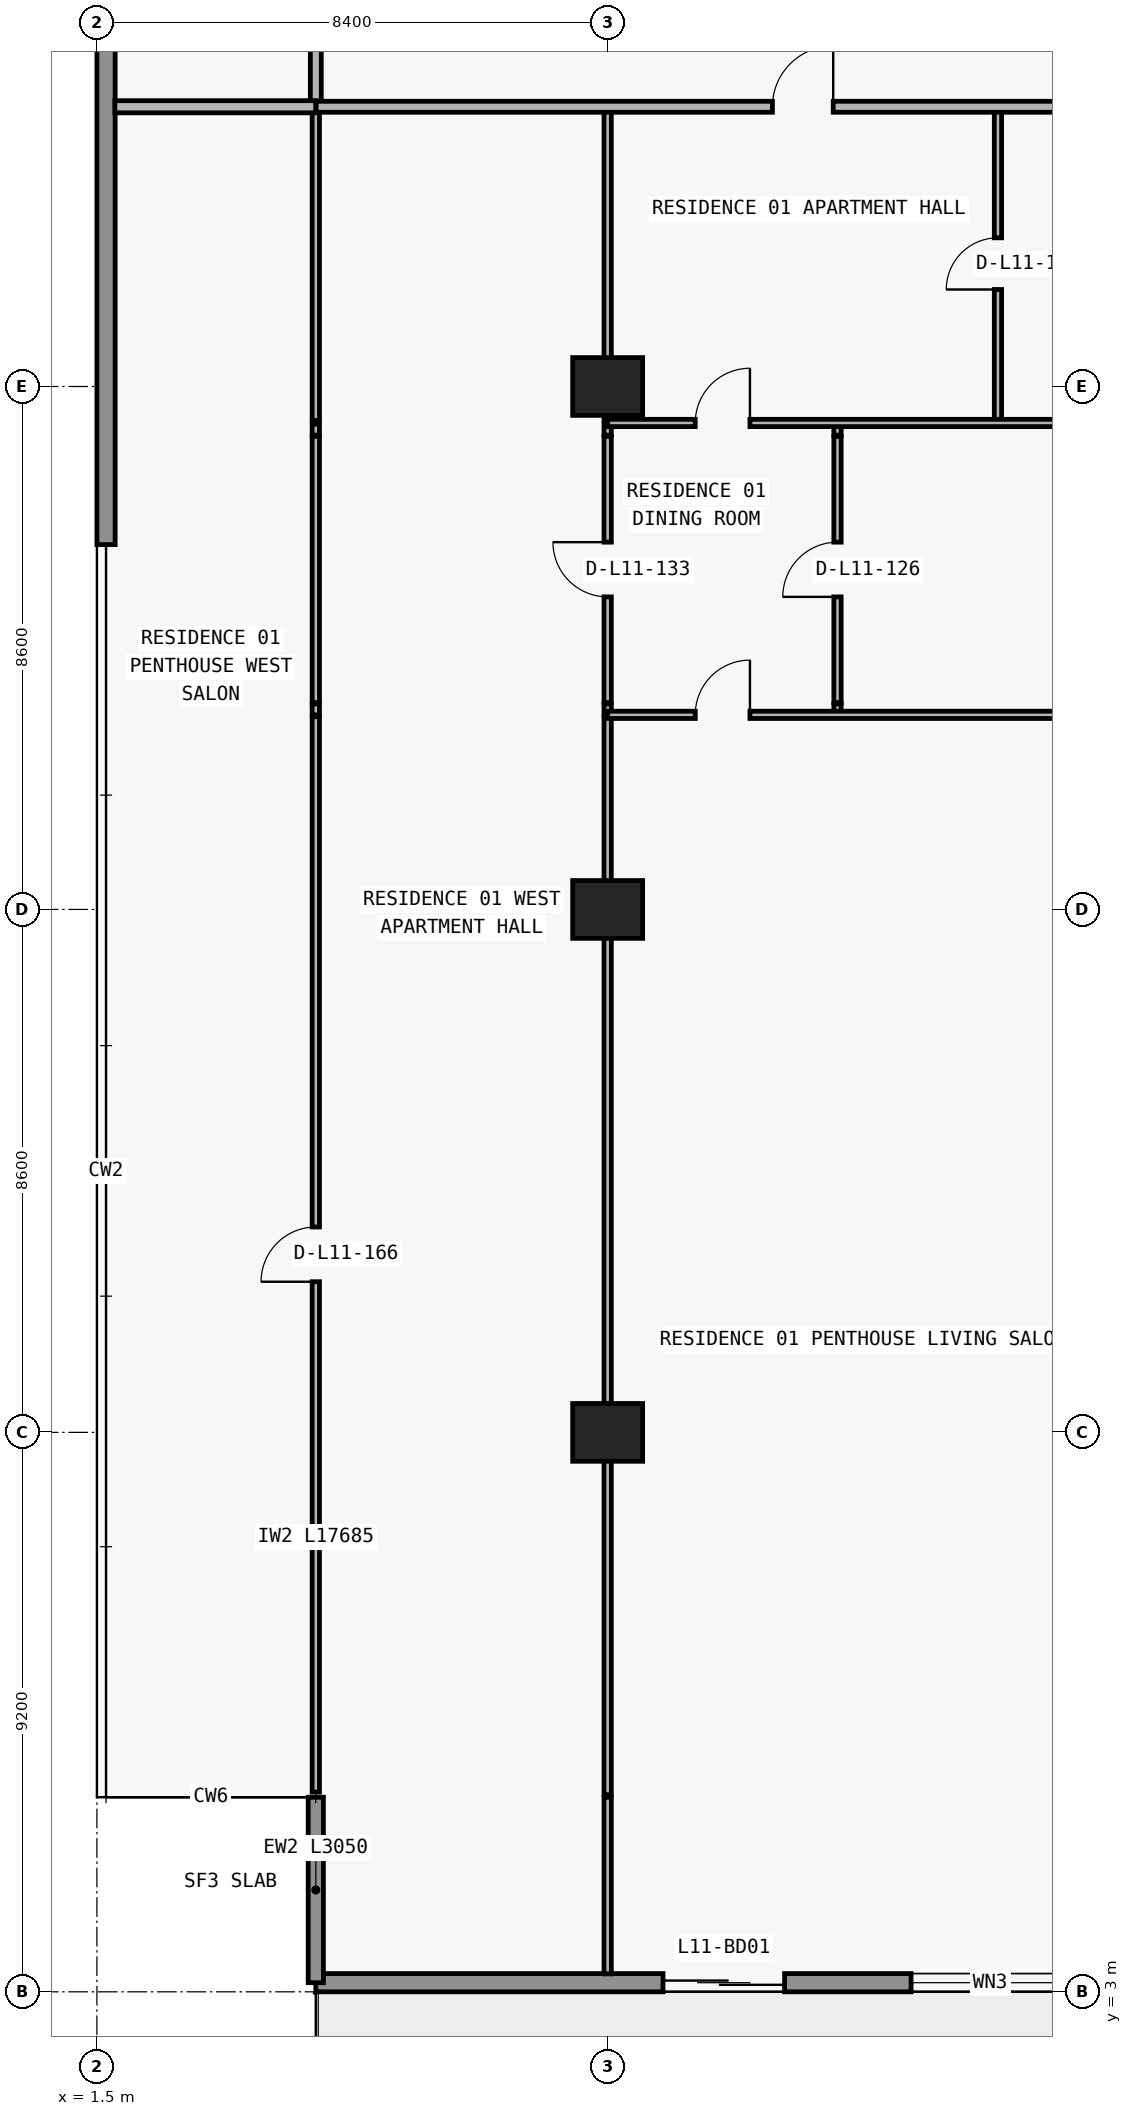
"""IFC4 building model, lengths in metres.
Left out: names, types, materials, properties, quantities, classifications, styles, units other than length and angle.
Written with IfcOpenShell. Run it as: python <this file> out.ifc"""

import sys

from ifc_helpers import new_model, si_unit, direction, frame, frame_2d, origin, origin_2d, place, context, subcontext, project, spatial, rectangle, extrude, element, fill, save


model = new_model("IFC4")
c1 = context("Model", 3, precision=1e-05, world=origin(), true_north=direction((0.0, 1.0)))
c2 = subcontext(c1, "Body", "Model", "MODEL_VIEW")
j1 = project(units=[si_unit("LENGTHUNIT", "METRE"), si_unit("PLANEANGLEUNIT", "RADIAN")], contexts=[c1])
p1 = place(None, origin())
s1 = spatial("IfcSite", under=j1, at=p1, CompositionType="ELEMENT")
p2 = place(p1, origin())
s2 = spatial("IfcBuilding", under=s1, at=p2, CompositionType="ELEMENT")
p3 = place(p2, frame((0.0, 0.0, 46.5)))
s3 = spatial("IfcBuildingStorey", under=s2, at=p3, CompositionType="ELEMENT", Elevation=46.5)
for number, where, z_axis, x_axis in (
    (1, (9.9, 12.2, 0.0), (0.0, 0.0, 1.0), (1.0, 0.0, 0.0)),
    (2, (9.9, 20.8, 0.0), (0.0, 0.0, 1.0), (1.0, 0.0, 0.0)),
    (3, (9.9, 29.4, 0.0), (0.0, 0.0, 1.0), (1.0, 0.0, 0.0)),
):
    element("IfcColumn", number, at=place(p3, frame(where, z_axis=z_axis, x_axis=x_axis)), inside=s3, PredefinedType="COLUMN", context=c2, shape_type="SweptSolid", body=[
        extrude(rectangle(XDim=1.15, YDim=0.95, at=origin_2d()), origin(), (0.0, 0.0, 1.0), 3.05),
    ])
p4 = place(p3, frame((72.7, 3.15, 0.0), z_axis=(0.0, 0.0, 1.0), x_axis=(-1.0, 0.0, 0.0)))
e4 = element("IfcWall", 4, at=p4, inside=s3, PredefinedType="STANDARD", context=c2, shape_type="SweptSolid", body=[
    extrude(rectangle(XDim=67.6, YDim=0.3, at=frame_2d((33.8, 0.0))), origin(), (0.0, 0.0, 1.0), 3.05),
])
p5 = place(p4, frame((59.89, 0.0, 0.0)))
e5 = element("IfcOpeningElement", 5, at=p5, cuts=e4, PredefinedType="OPENING", context=c2, shape_type="SweptSolid", body=[
    extrude(rectangle(XDim=2.0, YDim=2.3, at=frame_2d((1.0, 1.15))), frame((0.0, 0.16, 0.0), z_axis=(0.0, -1.0, 0.0), x_axis=(1.0, 0.0, 0.0)), (0.0, 0.0, 1.0), 0.32),
])
p6 = place(p4, frame((55.21, 0.0, 0.65)))
e6 = element("IfcOpeningElement", 6, at=p6, cuts=e4, PredefinedType="OPENING", context=c2, shape_type="SweptSolid", body=[
    extrude(rectangle(XDim=2.6, YDim=1.85, at=frame_2d((1.3, 0.925))), frame((0.0, 0.16, 0.0), z_axis=(0.0, -1.0, 0.0), x_axis=(1.0, 0.0, 0.0)), (0.0, 0.0, 1.0), 0.32),
])
p7 = place(p4, frame((49.1, 0.0, 0.85)))
e7 = element("IfcOpeningElement", 7, at=p7, cuts=e4, PredefinedType="OPENING", context=c2, shape_type="SweptSolid", body=[
    extrude(rectangle(XDim=2.2, YDim=1.55, at=frame_2d((1.1, 0.775))), frame((0.0, 0.16, 0.0), z_axis=(0.0, -1.0, 0.0), x_axis=(1.0, 0.0, 0.0)), (0.0, 0.0, 1.0), 0.32),
])
p8 = place(p4, frame((42.69, 0.0, 0.0)))
e8 = element("IfcOpeningElement", 8, at=p8, cuts=e4, PredefinedType="OPENING", context=c2, shape_type="SweptSolid", body=[
    extrude(rectangle(XDim=2.0, YDim=2.3, at=frame_2d((1.0, 1.15))), frame((0.0, 0.16, 0.0), z_axis=(0.0, -1.0, 0.0), x_axis=(1.0, 0.0, 0.0)), (0.0, 0.0, 1.0), 0.32),
])
p9 = place(p4, frame((38.59, 0.0, 0.85)))
e9 = element("IfcOpeningElement", 9, at=p9, cuts=e4, PredefinedType="OPENING", context=c2, shape_type="SweptSolid", body=[
    extrude(rectangle(XDim=1.8, YDim=1.55, at=frame_2d((0.9, 0.775))), frame((0.0, 0.16, 0.0), z_axis=(0.0, -1.0, 0.0), x_axis=(1.0, 0.0, 0.0)), (0.0, 0.0, 1.0), 0.32),
])
p10 = place(p4, frame((30.914, 0.0, 0.85)))
e10 = element("IfcOpeningElement", 10, at=p10, cuts=e4, PredefinedType="OPENING", context=c2, shape_type="SweptSolid", body=[
    extrude(rectangle(XDim=2.2, YDim=1.55, at=frame_2d((1.1, 0.775))), frame((0.0, 0.16, 0.0), z_axis=(0.0, -1.0, 0.0), x_axis=(1.0, 0.0, 0.0)), (0.0, 0.0, 1.0), 0.32),
])
p11 = place(p4, frame((26.69, 0.0, 0.0)))
e11 = element("IfcOpeningElement", 11, at=p11, cuts=e4, PredefinedType="OPENING", context=c2, shape_type="SweptSolid", body=[
    extrude(rectangle(XDim=2.0, YDim=2.3, at=frame_2d((1.0, 1.15))), frame((0.0, 0.16, 0.0), z_axis=(0.0, -1.0, 0.0), x_axis=(1.0, 0.0, 0.0)), (0.0, 0.0, 1.0), 0.32),
])
p12 = place(p4, frame((22.59, 0.0, 0.85)))
e12 = element("IfcOpeningElement", 12, at=p12, cuts=e4, PredefinedType="OPENING", context=c2, shape_type="SweptSolid", body=[
    extrude(rectangle(XDim=1.8, YDim=1.55, at=frame_2d((0.9, 0.775))), frame((0.0, 0.16, 0.0), z_axis=(0.0, -1.0, 0.0), x_axis=(1.0, 0.0, 0.0)), (0.0, 0.0, 1.0), 0.32),
])
p13 = place(p4, frame((18.69, 0.0, 0.0)))
e13 = element("IfcOpeningElement", 13, at=p13, cuts=e4, PredefinedType="OPENING", context=c2, shape_type="SweptSolid", body=[
    extrude(rectangle(XDim=2.0, YDim=2.3, at=frame_2d((1.0, 1.15))), frame((0.0, 0.16, 0.0), z_axis=(0.0, -1.0, 0.0), x_axis=(1.0, 0.0, 0.0)), (0.0, 0.0, 1.0), 0.32),
])
p14 = place(p4, frame((14.01, 0.0, 0.65)))
e14 = element("IfcOpeningElement", 14, at=p14, cuts=e4, PredefinedType="OPENING", context=c2, shape_type="SweptSolid", body=[
    extrude(rectangle(XDim=2.6, YDim=1.85, at=frame_2d((1.3, 0.925))), frame((0.0, 0.16, 0.0), z_axis=(0.0, -1.0, 0.0), x_axis=(1.0, 0.0, 0.0)), (0.0, 0.0, 1.0), 0.32),
])
p15 = place(p4, frame((7.9, 0.0, 0.85)))
e15 = element("IfcOpeningElement", 15, at=p15, cuts=e4, PredefinedType="OPENING", context=c2, shape_type="SweptSolid", body=[
    extrude(rectangle(XDim=2.2, YDim=1.55, at=frame_2d((1.1, 0.775))), frame((0.0, 0.16, 0.0), z_axis=(0.0, -1.0, 0.0), x_axis=(1.0, 0.0, 0.0)), (0.0, 0.0, 1.0), 0.32),
])
p16 = place(p3, frame((5.1, 6.2, 0.0), z_axis=(0.0, 0.0, 1.0), x_axis=(0.0, -1.0, 0.0)))
e16 = element("IfcWall", 16, at=p16, inside=s3, PredefinedType="ELEMENTEDWALL", context=c2, shape_type="SweptSolid", body=[
    extrude(rectangle(XDim=3.05, YDim=0.25, at=frame_2d((1.525, 0.0))), origin(), (0.0, 0.0, 1.0), 3.05),
])
p17 = place(p3, frame((1.65, 26.8, 0.0), z_axis=(0.0, 0.0, 1.0), x_axis=(0.0, 1.0, 0.0)))
e17 = element("IfcWall", 17, at=p17, inside=s3, PredefinedType="STANDARD", context=c2, shape_type="SweptSolid", body=[
    extrude(rectangle(XDim=20.6, YDim=0.3, at=frame_2d((10.3, 0.0))), origin(), (0.0, 0.0, 1.0), 3.05),
])
p18 = place(p3, frame((5.1, 6.285, 0.0), z_axis=(0.0, 0.0, 1.0), x_axis=(0.0, 1.0, 0.0)))
e18 = element("IfcWall", 18, at=p18, inside=s3, PredefinedType="PARTITIONING", context=c2, shape_type="SweptSolid", body=[
    extrude(rectangle(XDim=17.685, YDim=0.12, at=frame_2d((8.843, 0.0))), origin(), (0.0, 0.0, 1.0), 3.05),
])
p19 = place(p18, frame((8.393, 0.0, 0.0)))
e19 = element("IfcOpeningElement", 19, at=p19, cuts=e18, PredefinedType="OPENING", context=c2, shape_type="SweptSolid", body=[
    extrude(rectangle(XDim=0.9, YDim=2.15, at=frame_2d((0.45, 1.075))), frame((0.0, 0.07, 0.0), z_axis=(0.0, -1.0, 0.0), x_axis=(1.0, 0.0, 0.0)), (0.0, 0.0, 1.0), 0.14),
])
p20 = place(p3, frame((5.1, 24.0, 0.0), z_axis=(0.0, 0.0, 1.0), x_axis=(0.0, 1.0, 0.0)))
e20 = element("IfcWall", 20, at=p20, inside=s3, PredefinedType="PARTITIONING", context=c2, shape_type="SweptSolid", body=[
    extrude(rectangle(XDim=0.18, YDim=0.12, at=frame_2d((0.09, 0.0))), origin(), (0.0, 0.0, 1.0), 3.05),
])
p21 = place(p3, frame((5.1, 24.2, 0.0), z_axis=(0.0, 0.0, 1.0), x_axis=(0.0, 1.0, 0.0)))
e21 = element("IfcWall", 21, at=p21, inside=s3, PredefinedType="PARTITIONING", context=c2, shape_type="SweptSolid", body=[
    extrude(rectangle(XDim=4.38, YDim=0.12, at=frame_2d((2.19, 0.0))), origin(), (0.0, 0.0, 1.0), 3.05),
])
p22 = place(p3, frame((5.1, 28.6, 0.0), z_axis=(0.0, 0.0, 1.0), x_axis=(0.0, 1.0, 0.0)))
e22 = element("IfcWall", 22, at=p22, inside=s3, PredefinedType="PARTITIONING", context=c2, shape_type="SweptSolid", body=[
    extrude(rectangle(XDim=0.18, YDim=0.12, at=frame_2d((0.09, 0.0))), origin(), (0.0, 0.0, 1.0), 3.05),
])
p23 = place(p3, frame((5.1, 28.84, 0.0), z_axis=(0.0, 0.0, 1.0), x_axis=(0.0, 1.0, 0.0)))
e23 = element("IfcWall", 23, at=p23, inside=s3, PredefinedType="PARTITIONING", context=c2, shape_type="SweptSolid", body=[
    extrude(rectangle(XDim=5.16, YDim=0.12, at=frame_2d((2.58, 0.0))), origin(), (0.0, 0.0, 1.0), 3.05),
])
p24 = place(p3, frame((5.1, 34.005, 0.0), z_axis=(0.0, 0.0, 1.0), x_axis=(0.0, 1.0, 0.0)))
e24 = element("IfcWall", 24, at=p24, inside=s3, PredefinedType="PARTITIONING", context=c2, shape_type="SweptSolid", body=[
    extrude(rectangle(XDim=2.895, YDim=0.18, at=frame_2d((1.448, 0.0))), origin(), (0.0, 0.0, 1.0), 3.05),
])
p25 = place(p3, frame((9.9, 3.295, 0.0), z_axis=(0.0, 0.0, 1.0), x_axis=(0.0, 1.0, 0.0)))
e25 = element("IfcWall", 25, at=p25, inside=s3, PredefinedType="PARTITIONING", context=c2, shape_type="SweptSolid", body=[
    extrude(rectangle(XDim=2.905, YDim=0.12, at=frame_2d((1.453, 0.0))), origin(), (0.0, 0.0, 1.0), 3.05),
])
p26 = place(p3, frame((9.9, 6.24, 0.0), z_axis=(0.0, 0.0, 1.0), x_axis=(0.0, 1.0, 0.0)))
e26 = element("IfcWall", 26, at=p26, inside=s3, PredefinedType="PARTITIONING", context=c2, shape_type="SweptSolid", body=[
    extrude(rectangle(XDim=17.73, YDim=0.12, at=frame_2d((8.865, 0.0))), origin(), (0.0, 0.0, 1.0), 2.11),
])
p27 = place(p3, frame((9.9, 24.0, 0.0), z_axis=(0.0, 0.0, 1.0), x_axis=(0.0, 1.0, 0.0)))
e27 = element("IfcWall", 27, at=p27, inside=s3, PredefinedType="PARTITIONING", context=c2, shape_type="SweptSolid", body=[
    extrude(rectangle(XDim=0.18, YDim=0.12, at=frame_2d((0.09, 0.0))), origin(), (0.0, 0.0, 1.0), 2.11),
])
p28 = place(p3, frame((9.9, 24.2, 0.0), z_axis=(0.0, 0.0, 1.0), x_axis=(0.0, 1.0, 0.0)))
e28 = element("IfcWall", 28, at=p28, inside=s3, PredefinedType="PARTITIONING", context=c2, shape_type="SweptSolid", body=[
    extrude(rectangle(XDim=4.38, YDim=0.12, at=frame_2d((2.19, 0.0))), origin(), (0.0, 0.0, 1.0), 2.11),
])
p29 = place(p28, frame((1.74, 0.0, 0.0)))
e29 = element("IfcOpeningElement", 29, at=p29, cuts=e28, PredefinedType="OPENING", context=c2, shape_type="SweptSolid", body=[
    extrude(rectangle(XDim=0.9, YDim=2.06, at=frame_2d((0.45, 1.03))), frame((0.0, 0.07, 0.0), z_axis=(0.0, -1.0, 0.0), x_axis=(1.0, 0.0, 0.0)), (0.0, 0.0, 1.0), 0.14),
])
p30 = place(p3, frame((9.9, 28.6, 0.0), z_axis=(0.0, 0.0, 1.0), x_axis=(0.0, 1.0, 0.0)))
e30 = element("IfcWall", 30, at=p30, inside=s3, PredefinedType="PARTITIONING", context=c2, shape_type="SweptSolid", body=[
    extrude(rectangle(XDim=0.18, YDim=0.12, at=frame_2d((0.09, 0.0))), origin(), (0.0, 0.0, 1.0), 2.11),
])
p31 = place(p3, frame((9.9, 28.84, 0.0), z_axis=(0.0, 0.0, 1.0), x_axis=(0.0, 1.0, 0.0)))
e31 = element("IfcWall", 31, at=p31, inside=s3, PredefinedType="PARTITIONING", context=c2, shape_type="SweptSolid", body=[
    extrude(rectangle(XDim=5.16, YDim=0.12, at=frame_2d((2.58, 0.0))), origin(), (0.0, 0.0, 1.0), 2.11),
])
p32 = place(p3, frame((13.68, 24.0, 0.0), z_axis=(0.0, 0.0, 1.0), x_axis=(0.0, 1.0, 0.0)))
e32 = element("IfcWall", 32, at=p32, inside=s3, PredefinedType="PARTITIONING", context=c2, shape_type="SweptSolid", body=[
    extrude(rectangle(XDim=0.18, YDim=0.12, at=frame_2d((0.09, 0.0))), origin(), (0.0, 0.0, 1.0), 3.05),
])
p33 = place(p3, frame((13.68, 24.2, 0.0), z_axis=(0.0, 0.0, 1.0), x_axis=(0.0, 1.0, 0.0)))
e33 = element("IfcWall", 33, at=p33, inside=s3, PredefinedType="PARTITIONING", context=c2, shape_type="SweptSolid", body=[
    extrude(rectangle(XDim=4.38, YDim=0.12, at=frame_2d((2.19, 0.0))), origin(), (0.0, 0.0, 1.0), 3.05),
])
p34 = place(p33, frame((1.74, 0.0, 0.0)))
e34 = element("IfcOpeningElement", 34, at=p34, cuts=e33, PredefinedType="OPENING", context=c2, shape_type="SweptSolid", body=[
    extrude(rectangle(XDim=0.9, YDim=2.15, at=frame_2d((0.45, 1.075))), frame((0.0, 0.07, 0.0), z_axis=(0.0, -1.0, 0.0), x_axis=(1.0, 0.0, 0.0)), (0.0, 0.0, 1.0), 0.14),
])
p35 = place(p3, frame((13.68, 28.6, 0.0), z_axis=(0.0, 0.0, 1.0), x_axis=(0.0, 1.0, 0.0)))
e35 = element("IfcWall", 35, at=p35, inside=s3, PredefinedType="PARTITIONING", context=c2, shape_type="SweptSolid", body=[
    extrude(rectangle(XDim=0.18, YDim=0.12, at=frame_2d((0.09, 0.0))), origin(), (0.0, 0.0, 1.0), 3.05),
])
p36 = place(p3, frame((16.319, 28.84, 0.0), z_axis=(0.0, 0.0, 1.0), x_axis=(0.0, 1.0, 0.0)))
e36 = element("IfcWall", 36, at=p36, inside=s3, PredefinedType="PARTITIONING", context=c2, shape_type="SweptSolid", body=[
    extrude(rectangle(XDim=5.16, YDim=0.12, at=frame_2d((2.58, 0.0))), origin(), (0.0, 0.0, 1.0), 3.05),
])
p37 = place(p36, frame((2.155, 0.0, 0.0)))
e37 = element("IfcOpeningElement", 37, at=p37, cuts=e36, PredefinedType="OPENING", context=c2, shape_type="SweptSolid", body=[
    extrude(rectangle(XDim=0.85, YDim=2.1, at=frame_2d((0.425, 1.05))), frame((0.0, 0.07, 0.0), z_axis=(0.0, -1.0, 0.0), x_axis=(1.0, 0.0, 0.0)), (0.0, 0.0, 1.0), 0.14),
])
p38 = place(p3, frame((9.9, 24.0, 0.0), z_axis=(0.0, 0.0, 1.0), x_axis=(1.0, 0.0, 0.0)))
e38 = element("IfcWall", 38, at=p38, inside=s3, PredefinedType="PARTITIONING", context=c2, shape_type="SweptSolid", body=[
    extrude(rectangle(XDim=8.4, YDim=0.12, at=frame_2d((4.2, 0.0))), origin(), (0.0, 0.0, 1.0), 3.05),
])
p39 = place(p38, frame((1.44, 0.0, 0.0)))
e39 = element("IfcOpeningElement", 39, at=p39, cuts=e38, PredefinedType="OPENING", context=c2, shape_type="SweptSolid", body=[
    extrude(rectangle(XDim=0.9, YDim=2.15, at=frame_2d((0.45, 1.075))), frame((0.0, 0.07, 0.0), z_axis=(0.0, -1.0, 0.0), x_axis=(1.0, 0.0, 0.0)), (0.0, 0.0, 1.0), 0.14),
])
p40 = place(p3, frame((9.9, 28.8, 0.0), z_axis=(0.0, 0.0, 1.0), x_axis=(1.0, 0.0, 0.0)))
e40 = element("IfcWall", 40, at=p40, inside=s3, PredefinedType="PARTITIONING", context=c2, shape_type="SweptSolid", body=[
    extrude(rectangle(XDim=8.395, YDim=0.12, at=frame_2d((4.198, 0.0))), origin(), (0.0, 0.0, 1.0), 3.05),
])
p41 = place(p40, frame((1.44, 0.0, 0.0)))
e41 = element("IfcOpeningElement", 41, at=p41, cuts=e40, PredefinedType="OPENING", context=c2, shape_type="SweptSolid", body=[
    extrude(rectangle(XDim=0.9, YDim=2.15, at=frame_2d((0.45, 1.075))), frame((0.0, 0.07, 0.0), z_axis=(0.0, -1.0, 0.0), x_axis=(1.0, 0.0, 0.0)), (0.0, 0.0, 1.0), 0.14),
])
p42 = place(p3, frame((1.795, 34.0, 0.0), z_axis=(0.0, 0.0, 1.0), x_axis=(1.0, 0.0, 0.0)))
e42 = element("IfcWall", 42, at=p42, inside=s3, PredefinedType="PARTITIONING", context=c2, shape_type="SweptSolid", body=[
    extrude(rectangle(XDim=3.305, YDim=0.2, at=frame_2d((1.653, 0.0))), origin(), (0.0, 0.0, 1.0), 3.05),
])
p43 = place(p3, frame((5.105, 34.0, 0.0), z_axis=(0.0, 0.0, 1.0), x_axis=(1.0, 0.0, 0.0)))
e43 = element("IfcWall", 43, at=p43, inside=s3, PredefinedType="PARTITIONING", context=c2, shape_type="SweptSolid", body=[
    extrude(rectangle(XDim=21.545, YDim=0.18, at=frame_2d((10.772, 0.0))), origin(), (0.0, 0.0, 1.0), 3.05),
])
p44 = place(p43, frame((7.504, 0.0, 0.0)))
e44 = element("IfcOpeningElement", 44, at=p44, cuts=e43, PredefinedType="OPENING", context=c2, shape_type="SweptSolid", body=[
    extrude(rectangle(XDim=1.0, YDim=2.2, at=frame_2d((0.5, 1.1))), frame((0.0, 0.1, 0.0), z_axis=(0.0, -1.0, 0.0), x_axis=(1.0, 0.0, 0.0)), (0.0, 0.0, 1.0), 0.2),
])
p45 = place(p5, origin())
e45 = element("IfcDoor", 45, at=p45, inside=s3, OperationType="DOUBLE_DOOR_SLIDING", PredefinedType="DOOR", context=c2, shape_type="SweptSolid", body=[
    extrude(rectangle(XDim=2.0, YDim=2.3, at=frame_2d((1.0, 1.15))), frame((0.0, 0.025, 0.0), z_axis=(0.0, -1.0, 0.0), x_axis=(1.0, 0.0, 0.0)), (0.0, 0.0, 1.0), 0.05),
])
fill(e5, e45)
p46 = place(p6, origin())
e46 = element("IfcWindow", 46, at=p46, inside=s3, PartitioningType="SINGLE_PANEL", PredefinedType="WINDOW", context=c2, shape_type="SweptSolid", body=[
    extrude(rectangle(XDim=2.6, YDim=1.85, at=frame_2d((1.3, 0.925))), frame((0.0, 0.03, 0.0), z_axis=(0.0, -1.0, 0.0), x_axis=(1.0, 0.0, 0.0)), (0.0, 0.0, 1.0), 0.06),
])
fill(e6, e46)
p47 = place(p44, origin())
e47 = element("IfcDoor", 47, at=p47, inside=s3, OperationType="SINGLE_SWING_RIGHT", PredefinedType="DOOR", context=c2, shape_type="SweptSolid", body=[
    extrude(rectangle(XDim=1.0, YDim=2.2, at=frame_2d((0.5, 1.1))), frame((0.0, 0.025, 0.0), z_axis=(0.0, -1.0, 0.0), x_axis=(1.0, 0.0, 0.0)), (0.0, 0.0, 1.0), 0.05),
])
fill(e44, e47)
p48 = place(p37, origin())
e48 = element("IfcDoor", 48, at=p48, inside=s3, OperationType="SINGLE_SWING_LEFT", PredefinedType="DOOR", context=c2, shape_type="SweptSolid", body=[
    extrude(rectangle(XDim=0.85, YDim=2.1, at=frame_2d((0.425, 1.05))), frame((0.0, 0.025, 0.0), z_axis=(0.0, -1.0, 0.0), x_axis=(1.0, 0.0, 0.0)), (0.0, 0.0, 1.0), 0.05),
])
fill(e37, e48)
p49 = place(p41, origin())
e49 = element("IfcDoor", 49, at=p49, inside=s3, OperationType="SINGLE_SWING_RIGHT", PredefinedType="DOOR", context=c2, shape_type="SweptSolid", body=[
    extrude(rectangle(XDim=0.9, YDim=2.15, at=frame_2d((0.45, 1.075))), frame((0.0, 0.025, 0.0), z_axis=(0.0, -1.0, 0.0), x_axis=(1.0, 0.0, 0.0)), (0.0, 0.0, 1.0), 0.05),
])
fill(e41, e49)
p50 = place(p34, origin())
e50 = element("IfcDoor", 50, at=p50, inside=s3, OperationType="SINGLE_SWING_LEFT", PredefinedType="DOOR", context=c2, shape_type="SweptSolid", body=[
    extrude(rectangle(XDim=0.9, YDim=2.15, at=frame_2d((0.45, 1.075))), frame((0.0, 0.025, 0.0), z_axis=(0.0, -1.0, 0.0), x_axis=(1.0, 0.0, 0.0)), (0.0, 0.0, 1.0), 0.05),
])
fill(e34, e50)
p51 = place(p39, origin())
e51 = element("IfcDoor", 51, at=p51, inside=s3, OperationType="SINGLE_SWING_RIGHT", PredefinedType="DOOR", context=c2, shape_type="SweptSolid", body=[
    extrude(rectangle(XDim=0.9, YDim=2.15, at=frame_2d((0.45, 1.075))), frame((0.0, 0.025, 0.0), z_axis=(0.0, -1.0, 0.0), x_axis=(1.0, 0.0, 0.0)), (0.0, 0.0, 1.0), 0.05),
])
fill(e39, e51)
p52 = place(p29, origin())
e52 = element("IfcDoor", 52, at=p52, inside=s3, OperationType="SINGLE_SWING_RIGHT", PredefinedType="DOOR", context=c2, shape_type="SweptSolid", body=[
    extrude(rectangle(XDim=0.9, YDim=2.06, at=frame_2d((0.45, 1.03))), frame((0.0, 0.025, 0.0), z_axis=(0.0, -1.0, 0.0), x_axis=(1.0, 0.0, 0.0)), (0.0, 0.0, 1.0), 0.05),
])
fill(e29, e52)
p53 = place(p19, origin())
e53 = element("IfcDoor", 53, at=p53, inside=s3, OperationType="SINGLE_SWING_LEFT", PredefinedType="DOOR", context=c2, shape_type="SweptSolid", body=[
    extrude(rectangle(XDim=0.9, YDim=2.15, at=frame_2d((0.45, 1.075))), frame((0.0, 0.025, 0.0), z_axis=(0.0, -1.0, 0.0), x_axis=(1.0, 0.0, 0.0)), (0.0, 0.0, 1.0), 0.05),
])
fill(e19, e53)
save(model, sys.argv[1])
